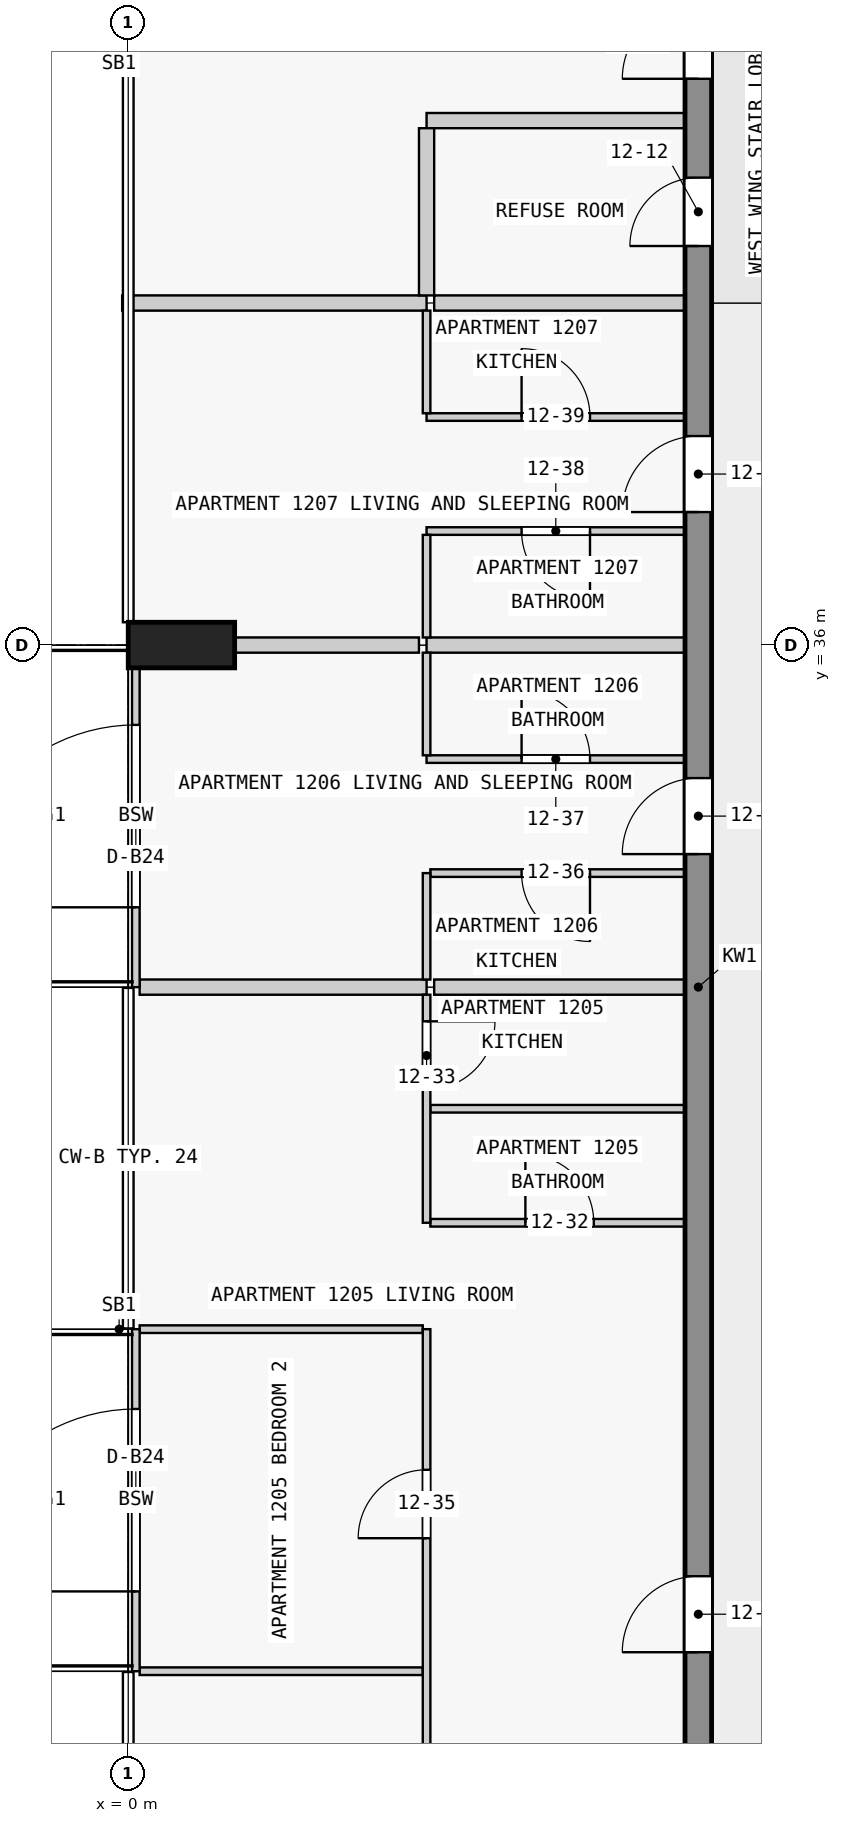
"""IFC4 building model, lengths in metres.
Left out: names, types, materials, properties, quantities, classifications, styles, units other than length and angle.
Written with IfcOpenShell. Run it as: python <this file> out.ifc"""

import sys

from ifc_helpers import new_model, si_unit, direction, frame, frame_2d, origin, origin_2d, place, context, subcontext, project, spatial, rectangle, extrude, element, fill, save


model = new_model("IFC4")
c1 = context("Model", 3, precision=1e-05, world=origin(), true_north=direction((0.0, 1.0)))
c2 = subcontext(c1, "Body", "Model", "MODEL_VIEW")
j1 = project(units=[si_unit("LENGTHUNIT", "METRE"), si_unit("PLANEANGLEUNIT", "RADIAN")], contexts=[c1])
p1 = place(None, origin())
s1 = spatial("IfcSite", under=j1, at=p1, CompositionType="ELEMENT")
p2 = place(p1, origin())
s2 = spatial("IfcBuilding", under=s1, at=p2, CompositionType="ELEMENT")
p3 = place(p2, frame((0.0, 0.0, 51.3)))
s3 = spatial("IfcBuildingStorey", under=s2, at=p3, CompositionType="ELEMENT", Elevation=51.3)
p4 = place(p3, frame((0.7, 36.0, 0.0), z_axis=(0.0, 0.0, 1.0), x_axis=(0.0, 1.0, 0.0)))
e1 = element("IfcColumn", 1, at=p4, inside=s3, PredefinedType="COLUMN", context=c2, shape_type="SweptSolid", body=[
    extrude(rectangle(XDim=0.6, YDim=1.4, at=origin_2d()), origin(), (0.0, 0.0, 1.0), 3.5),
])
p5 = place(p3, frame((7.5, 18.0, 0.0), z_axis=(0.0, 0.0, 1.0), x_axis=(0.0, 1.0, 0.0)))
e2 = element("IfcWall", 2, at=p5, inside=s3, PredefinedType="SHEAR", context=c2, shape_type="SweptSolid", body=[
    extrude(rectangle(XDim=27.0, YDim=0.35, at=frame_2d((13.5, 0.0))), origin(), (0.0, 0.0, 1.0), 3.25),
])
p6 = place(p5, frame((4.75, 0.0, 0.0)))
e3 = element("IfcOpeningElement", 3, at=p6, cuts=e2, PredefinedType="OPENING", context=c2, shape_type="SweptSolid", body=[
    extrude(rectangle(XDim=1.0, YDim=2.1, at=frame_2d((0.5, 1.05))), frame((0.0, 0.185, 0.0), z_axis=(0.0, -1.0, 0.0), x_axis=(1.0, 0.0, 0.0)), (0.0, 0.0, 1.0), 0.37),
])
p7 = place(p5, frame((15.25, 0.0, 0.0)))
e4 = element("IfcOpeningElement", 4, at=p7, cuts=e2, PredefinedType="OPENING", context=c2, shape_type="SweptSolid", body=[
    extrude(rectangle(XDim=1.0, YDim=2.1, at=frame_2d((0.5, 1.05))), frame((0.0, 0.185, 0.0), z_axis=(0.0, -1.0, 0.0), x_axis=(1.0, 0.0, 0.0)), (0.0, 0.0, 1.0), 0.37),
])
p8 = place(p5, frame((19.75, 0.0, 0.0)))
e5 = element("IfcOpeningElement", 5, at=p8, cuts=e2, PredefinedType="OPENING", context=c2, shape_type="SweptSolid", body=[
    extrude(rectangle(XDim=1.0, YDim=2.1, at=frame_2d((0.5, 1.05))), frame((0.0, 0.185, 0.0), z_axis=(0.0, -1.0, 0.0), x_axis=(1.0, 0.0, 0.0)), (0.0, 0.0, 1.0), 0.37),
])
p9 = place(p5, frame((23.25, 0.0, 0.0)))
e6 = element("IfcOpeningElement", 6, at=p9, cuts=e2, PredefinedType="OPENING", context=c2, shape_type="SweptSolid", body=[
    extrude(rectangle(XDim=0.9, YDim=2.1, at=frame_2d((0.45, 1.05))), frame((0.0, 0.185, 0.0), z_axis=(0.0, -1.0, 0.0), x_axis=(1.0, 0.0, 0.0)), (0.0, 0.0, 1.0), 0.37),
])
p10 = place(p5, frame((25.45, 0.0, 0.0)))
e7 = element("IfcOpeningElement", 7, at=p10, cuts=e2, PredefinedType="OPENING", context=c2, shape_type="SweptSolid", body=[
    extrude(rectangle(XDim=1.0, YDim=2.1, at=frame_2d((0.5, 1.05))), frame((0.0, 0.185, 0.0), z_axis=(0.0, -1.0, 0.0), x_axis=(1.0, 0.0, 0.0)), (0.0, 0.0, 1.0), 0.37),
])
p11 = place(p3, frame((0.1, 22.5, 0.0), z_axis=(0.0, 0.0, 1.0), x_axis=(0.0, 1.0, 0.0)))
e8 = element("IfcWall", 8, at=p11, inside=s3, PredefinedType="STANDARD", context=c2, shape_type="SweptSolid", body=[
    extrude(rectangle(XDim=4.5, YDim=0.1, at=frame_2d((2.25, 0.0))), origin(), (0.0, 0.0, 1.0), 3.25),
])
p12 = place(p11, frame((1.05, 0.0, 0.0)))
e9 = element("IfcOpeningElement", 9, at=p12, cuts=e8, PredefinedType="OPENING", context=c2, shape_type="SweptSolid", body=[
    extrude(rectangle(XDim=2.4, YDim=2.4, at=frame_2d((1.2, 1.2))), frame((0.0, 0.06, 0.0), z_axis=(0.0, -1.0, 0.0), x_axis=(1.0, 0.0, 0.0)), (0.0, 0.0, 1.0), 0.12),
])
p13 = place(p3, frame((0.1, 31.5, 0.0), z_axis=(0.0, 0.0, 1.0), x_axis=(0.0, 1.0, 0.0)))
e10 = element("IfcWall", 10, at=p13, inside=s3, PredefinedType="STANDARD", context=c2, shape_type="SweptSolid", body=[
    extrude(rectangle(XDim=4.5, YDim=0.1, at=frame_2d((2.25, 0.0))), origin(), (0.0, 0.0, 1.0), 3.25),
])
p14 = place(p13, frame((1.05, 0.0, 0.0)))
e11 = element("IfcOpeningElement", 11, at=p14, cuts=e10, PredefinedType="OPENING", context=c2, shape_type="SweptSolid", body=[
    extrude(rectangle(XDim=2.4, YDim=2.4, at=frame_2d((1.2, 1.2))), frame((0.0, 0.06, 0.0), z_axis=(0.0, -1.0, 0.0), x_axis=(1.0, 0.0, 0.0)), (0.0, 0.0, 1.0), 0.12),
])
for number, where, z_axis, x_axis in (
    (12, (3.875, 22.5, 0.0), (0.0, 0.0, 1.0), (-1.0, 0.0, 0.0)),
    (13, (3.875, 27.0, 0.0), (0.0, 0.0, 1.0), (-1.0, 0.0, 0.0)),
):
    element("IfcWall", number, at=place(p3, frame(where, z_axis=z_axis, x_axis=x_axis)), inside=s3, PredefinedType="PARTITIONING", context=c2, shape_type="SweptSolid", body=[
        extrude(rectangle(XDim=3.725, YDim=0.1, at=frame_2d((1.863, 0.0))), origin(), (0.0, 0.0, 1.0), 3.25),
    ])
p15 = place(p3, frame((3.975, 28.4, 0.0), z_axis=(0.0, 0.0, 1.0), x_axis=(1.0, 0.0, 0.0)))
e14 = element("IfcWall", 14, at=p15, inside=s3, PredefinedType="PARTITIONING", context=c2, shape_type="SweptSolid", body=[
    extrude(rectangle(XDim=3.35, YDim=0.1, at=frame_2d((1.675, 0.0))), origin(), (0.0, 0.0, 1.0), 3.25),
])
p16 = place(p15, frame((1.25, 0.0, 0.0)))
e15 = element("IfcOpeningElement", 15, at=p16, cuts=e14, PredefinedType="OPENING", context=c2, shape_type="SweptSolid", body=[
    extrude(rectangle(XDim=0.9, YDim=2.1, at=frame_2d((0.45, 1.05))), frame((0.0, 0.06, 0.0), z_axis=(0.0, -1.0, 0.0), x_axis=(1.0, 0.0, 0.0)), (0.0, 0.0, 1.0), 0.12),
])
p17 = place(p3, frame((7.325, 29.9, 0.0), z_axis=(0.0, 0.0, 1.0), x_axis=(-1.0, 0.0, 0.0)))
e16 = element("IfcWall", 16, at=p17, inside=s3, PredefinedType="PARTITIONING", context=c2, shape_type="SweptSolid", body=[
    extrude(rectangle(XDim=3.35, YDim=0.1, at=frame_2d((1.675, 0.0))), origin(), (0.0, 0.0, 1.0), 3.25),
])
p18 = place(p3, frame((7.325, 31.5, 0.0), z_axis=(0.0, 0.0, 1.0), x_axis=(-1.0, 0.0, 0.0)))
e17 = element("IfcWall", 17, at=p18, inside=s3, PredefinedType="PARTITIONING", context=c2, shape_type="SweptSolid", body=[
    extrude(rectangle(XDim=3.3, YDim=0.2, at=frame_2d((1.65, 0.0))), origin(), (0.0, 0.0, 1.0), 3.25),
])
p19 = place(p3, frame((0.15, 31.5, 0.0), z_axis=(0.0, 0.0, 1.0), x_axis=(1.0, 0.0, 0.0)))
e18 = element("IfcWall", 18, at=p19, inside=s3, PredefinedType="PARTITIONING", context=c2, shape_type="SweptSolid", body=[
    extrude(rectangle(XDim=3.775, YDim=0.2, at=frame_2d((1.888, 0.0))), origin(), (0.0, 0.0, 1.0), 3.25),
])
p20 = place(p3, frame((7.325, 33.0, 0.0), z_axis=(0.0, 0.0, 1.0), x_axis=(-1.0, 0.0, 0.0)))
e19 = element("IfcWall", 19, at=p20, inside=s3, PredefinedType="PARTITIONING", context=c2, shape_type="SweptSolid", body=[
    extrude(rectangle(XDim=3.35, YDim=0.1, at=frame_2d((1.675, 0.0))), origin(), (0.0, 0.0, 1.0), 3.25),
])
p21 = place(p20, frame((1.25, 0.0, 0.0)))
e20 = element("IfcOpeningElement", 20, at=p21, cuts=e19, PredefinedType="OPENING", context=c2, shape_type="SweptSolid", body=[
    extrude(rectangle(XDim=0.9, YDim=2.1, at=frame_2d((0.45, 1.05))), frame((0.0, 0.06, 0.0), z_axis=(0.0, -1.0, 0.0), x_axis=(1.0, 0.0, 0.0)), (0.0, 0.0, 1.0), 0.12),
])
p22 = place(p3, frame((3.925, 34.5, 0.0), z_axis=(0.0, 0.0, 1.0), x_axis=(1.0, 0.0, 0.0)))
e21 = element("IfcWall", 21, at=p22, inside=s3, PredefinedType="PARTITIONING", context=c2, shape_type="SweptSolid", body=[
    extrude(rectangle(XDim=3.4, YDim=0.1, at=frame_2d((1.7, 0.0))), origin(), (0.0, 0.0, 1.0), 3.25),
])
p23 = place(p22, frame((1.25, 0.0, 0.0)))
e22 = element("IfcOpeningElement", 22, at=p23, cuts=e21, PredefinedType="OPENING", context=c2, shape_type="SweptSolid", body=[
    extrude(rectangle(XDim=0.9, YDim=2.1, at=frame_2d((0.45, 1.05))), frame((0.0, 0.06, 0.0), z_axis=(0.0, -1.0, 0.0), x_axis=(1.0, 0.0, 0.0)), (0.0, 0.0, 1.0), 0.12),
])
p24 = place(p3, frame((7.325, 36.0, 0.0), z_axis=(0.0, 0.0, 1.0), x_axis=(-1.0, 0.0, 0.0)))
e23 = element("IfcWall", 23, at=p24, inside=s3, PredefinedType="PARTITIONING", context=c2, shape_type="SweptSolid", body=[
    extrude(rectangle(XDim=3.4, YDim=0.2, at=frame_2d((1.7, 0.0))), origin(), (0.0, 0.0, 1.0), 3.25),
])
p25 = place(p3, frame((1.4, 36.0, 0.0), z_axis=(0.0, 0.0, 1.0), x_axis=(1.0, 0.0, 0.0)))
e24 = element("IfcWall", 24, at=p25, inside=s3, PredefinedType="PARTITIONING", context=c2, shape_type="SweptSolid", body=[
    extrude(rectangle(XDim=2.425, YDim=0.2, at=frame_2d((1.212, 0.0))), origin(), (0.0, 0.0, 1.0), 3.25),
])
p26 = place(p3, frame((7.325, 37.5, 0.0), z_axis=(0.0, 0.0, 1.0), x_axis=(-1.0, 0.0, 0.0)))
e25 = element("IfcWall", 25, at=p26, inside=s3, PredefinedType="PARTITIONING", context=c2, shape_type="SweptSolid", body=[
    extrude(rectangle(XDim=3.4, YDim=0.1, at=frame_2d((1.7, 0.0))), origin(), (0.0, 0.0, 1.0), 3.25),
])
p27 = place(p26, frame((1.25, 0.0, 0.0)))
e26 = element("IfcOpeningElement", 26, at=p27, cuts=e25, PredefinedType="OPENING", context=c2, shape_type="SweptSolid", body=[
    extrude(rectangle(XDim=0.9, YDim=2.1, at=frame_2d((0.45, 1.05))), frame((0.0, 0.06, 0.0), z_axis=(0.0, -1.0, 0.0), x_axis=(1.0, 0.0, 0.0)), (0.0, 0.0, 1.0), 0.12),
])
p28 = place(p3, frame((3.925, 39.0, 0.0), z_axis=(0.0, 0.0, 1.0), x_axis=(1.0, 0.0, 0.0)))
e27 = element("IfcWall", 27, at=p28, inside=s3, PredefinedType="PARTITIONING", context=c2, shape_type="SweptSolid", body=[
    extrude(rectangle(XDim=3.4, YDim=0.1, at=frame_2d((1.7, 0.0))), origin(), (0.0, 0.0, 1.0), 3.25),
])
p29 = place(p28, frame((1.25, 0.0, 0.0)))
e28 = element("IfcOpeningElement", 28, at=p29, cuts=e27, PredefinedType="OPENING", context=c2, shape_type="SweptSolid", body=[
    extrude(rectangle(XDim=0.9, YDim=2.1, at=frame_2d((0.45, 1.05))), frame((0.0, 0.06, 0.0), z_axis=(0.0, -1.0, 0.0), x_axis=(1.0, 0.0, 0.0)), (0.0, 0.0, 1.0), 0.12),
])
p30 = place(p3, frame((7.325, 40.5, 0.0), z_axis=(0.0, 0.0, 1.0), x_axis=(-1.0, 0.0, 0.0)))
e29 = element("IfcWall", 29, at=p30, inside=s3, PredefinedType="PARTITIONING", context=c2, shape_type="SweptSolid", body=[
    extrude(rectangle(XDim=3.3, YDim=0.2, at=frame_2d((1.65, 0.0))), origin(), (0.0, 0.0, 1.0), 3.25),
])
p31 = place(p3, frame((-0.08, 40.5, 0.0), z_axis=(0.0, 0.0, 1.0), x_axis=(1.0, 0.0, 0.0)))
e30 = element("IfcWall", 30, at=p31, inside=s3, PredefinedType="PARTITIONING", context=c2, shape_type="SweptSolid", body=[
    extrude(rectangle(XDim=4.005, YDim=0.2, at=frame_2d((2.002, 0.0))), origin(), (0.0, 0.0, 1.0), 3.25),
])
p32 = place(p3, frame((7.325, 42.9, 0.0), z_axis=(0.0, 0.0, 1.0), x_axis=(-1.0, 0.0, 0.0)))
e31 = element("IfcWall", 31, at=p32, inside=s3, PredefinedType="PARTITIONING", context=c2, shape_type="SweptSolid", body=[
    extrude(rectangle(XDim=3.4, YDim=0.2, at=frame_2d((1.7, 0.0))), origin(), (0.0, 0.0, 1.0), 3.25),
])
p33 = place(p3, frame((3.925, 31.4, 0.0), z_axis=(0.0, 0.0, 1.0), x_axis=(0.0, -1.0, 0.0)))
e32 = element("IfcWall", 32, at=p33, inside=s3, PredefinedType="PARTITIONING", context=c2, shape_type="SweptSolid", body=[
    extrude(rectangle(XDim=3.0, YDim=0.1, at=frame_2d((1.5, 0.0))), origin(), (0.0, 0.0, 1.0), 3.25),
])
p34 = place(p33, frame((0.35, 0.0, 0.0)))
e33 = element("IfcOpeningElement", 33, at=p34, cuts=e32, PredefinedType="OPENING", context=c2, shape_type="SweptSolid", body=[
    extrude(rectangle(XDim=0.9, YDim=2.1, at=frame_2d((0.45, 1.05))), frame((0.0, 0.06, 0.0), z_axis=(0.0, -1.0, 0.0), x_axis=(1.0, 0.0, 0.0)), (0.0, 0.0, 1.0), 0.12),
])
p35 = place(p3, frame((3.925, 33.0, 0.0), z_axis=(0.0, 0.0, 1.0), x_axis=(0.0, -1.0, 0.0)))
e34 = element("IfcWall", 34, at=p35, inside=s3, PredefinedType="PARTITIONING", context=c2, shape_type="SweptSolid", body=[
    extrude(rectangle(XDim=1.4, YDim=0.1, at=frame_2d((0.7, 0.0))), origin(), (0.0, 0.0, 1.0), 3.25),
])
for number, where, z_axis, x_axis in (
    (35, (3.925, 35.9, 0.0), (0.0, 0.0, 1.0), (0.0, -1.0, 0.0)),
    (36, (3.925, 37.45, 0.0), (0.0, 0.0, 1.0), (0.0, -1.0, 0.0)),
    (37, (3.925, 40.4, 0.0), (0.0, 0.0, 1.0), (0.0, -1.0, 0.0)),
):
    element("IfcWall", number, at=place(p3, frame(where, z_axis=z_axis, x_axis=x_axis)), inside=s3, PredefinedType="PARTITIONING", context=c2, shape_type="SweptSolid", body=[
        extrude(rectangle(XDim=1.35, YDim=0.1, at=frame_2d((0.675, 0.0))), origin(), (0.0, 0.0, 1.0), 3.25),
    ])
p36 = place(p3, frame((3.925, 18.0, 0.0), z_axis=(0.0, 0.0, 1.0), x_axis=(0.0, 1.0, 0.0)))
e38 = element("IfcWall", 38, at=p36, inside=s3, PredefinedType="PARTITIONING", context=c2, shape_type="SweptSolid", body=[
    extrude(rectangle(XDim=9.0, YDim=0.1, at=frame_2d((4.5, 0.0))), origin(), (0.0, 0.0, 1.0), 3.25),
])
p37 = place(p36, frame((1.85, 0.0, 0.0)))
e39 = element("IfcOpeningElement", 39, at=p37, cuts=e38, PredefinedType="OPENING", context=c2, shape_type="SweptSolid", body=[
    extrude(rectangle(XDim=0.9, YDim=2.1, at=frame_2d((0.45, 1.05))), frame((0.0, 0.06, 0.0), z_axis=(0.0, -1.0, 0.0), x_axis=(1.0, 0.0, 0.0)), (0.0, 0.0, 1.0), 0.12),
])
p38 = place(p36, frame((6.25, 0.0, 0.0)))
e40 = element("IfcOpeningElement", 40, at=p38, cuts=e38, PredefinedType="OPENING", context=c2, shape_type="SweptSolid", body=[
    extrude(rectangle(XDim=0.9, YDim=2.1, at=frame_2d((0.45, 1.05))), frame((0.0, 0.06, 0.0), z_axis=(0.0, -1.0, 0.0), x_axis=(1.0, 0.0, 0.0)), (0.0, 0.0, 1.0), 0.12),
])
p39 = place(p3, frame((3.925, 42.8, 0.0), z_axis=(0.0, 0.0, 1.0), x_axis=(0.0, -1.0, 0.0)))
e41 = element("IfcWall", 41, at=p39, inside=s3, PredefinedType="PARTITIONING", context=c2, shape_type="SweptSolid", body=[
    extrude(rectangle(XDim=2.2, YDim=0.2, at=frame_2d((1.1, 0.0))), origin(), (0.0, 0.0, 1.0), 3.25),
])
p40 = place(p12, origin())
e42 = element("IfcDoor", 42, at=p40, inside=s3, OperationType="SINGLE_SWING_LEFT", PredefinedType="DOOR", context=c2, shape_type="SweptSolid", body=[
    extrude(rectangle(XDim=2.4, YDim=2.4, at=frame_2d((1.2, 1.2))), frame((0.0, 0.025, 0.0), z_axis=(0.0, -1.0, 0.0), x_axis=(1.0, 0.0, 0.0)), (0.0, 0.0, 1.0), 0.05),
])
fill(e9, e42)
p41 = place(p14, origin())
e43 = element("IfcDoor", 43, at=p41, inside=s3, OperationType="SINGLE_SWING_LEFT", PredefinedType="DOOR", context=c2, shape_type="SweptSolid", body=[
    extrude(rectangle(XDim=2.4, YDim=2.4, at=frame_2d((1.2, 1.2))), frame((0.0, 0.025, 0.0), z_axis=(0.0, -1.0, 0.0), x_axis=(1.0, 0.0, 0.0)), (0.0, 0.0, 1.0), 0.05),
])
fill(e11, e43)
p42 = place(p6, origin())
e44 = element("IfcDoor", 44, at=p42, inside=s3, OperationType="SINGLE_SWING_LEFT", PredefinedType="DOOR", context=c2, shape_type="SweptSolid", body=[
    extrude(rectangle(XDim=1.0, YDim=2.1, at=frame_2d((0.5, 1.05))), frame((0.0, 0.025, 0.0), z_axis=(0.0, -1.0, 0.0), x_axis=(1.0, 0.0, 0.0)), (0.0, 0.0, 1.0), 0.05),
])
fill(e3, e44)
p43 = place(p7, origin())
e45 = element("IfcDoor", 45, at=p43, inside=s3, OperationType="SINGLE_SWING_RIGHT", PredefinedType="DOOR", context=c2, shape_type="SweptSolid", body=[
    extrude(rectangle(XDim=1.0, YDim=2.1, at=frame_2d((0.5, 1.05))), frame((0.0, 0.025, 0.0), z_axis=(0.0, -1.0, 0.0), x_axis=(1.0, 0.0, 0.0)), (0.0, 0.0, 1.0), 0.05),
])
fill(e4, e45)
p44 = place(p8, origin())
e46 = element("IfcDoor", 46, at=p44, inside=s3, OperationType="SINGLE_SWING_RIGHT", PredefinedType="DOOR", context=c2, shape_type="SweptSolid", body=[
    extrude(rectangle(XDim=1.0, YDim=2.1, at=frame_2d((0.5, 1.05))), frame((0.0, 0.025, 0.0), z_axis=(0.0, -1.0, 0.0), x_axis=(1.0, 0.0, 0.0)), (0.0, 0.0, 1.0), 0.05),
])
fill(e5, e46)
p45 = place(p9, origin())
e47 = element("IfcDoor", 47, at=p45, inside=s3, OperationType="SINGLE_SWING_RIGHT", PredefinedType="DOOR", context=c2, shape_type="SweptSolid", body=[
    extrude(rectangle(XDim=0.9, YDim=2.1, at=frame_2d((0.45, 1.05))), frame((0.0, 0.025, 0.0), z_axis=(0.0, -1.0, 0.0), x_axis=(1.0, 0.0, 0.0)), (0.0, 0.0, 1.0), 0.05),
])
fill(e6, e47)
p46 = place(p10, origin())
e48 = element("IfcDoor", 48, at=p46, inside=s3, OperationType="SINGLE_SWING_RIGHT", PredefinedType="DOOR", context=c2, shape_type="SweptSolid", body=[
    extrude(rectangle(XDim=1.0, YDim=2.1, at=frame_2d((0.5, 1.05))), frame((0.0, 0.025, 0.0), z_axis=(0.0, -1.0, 0.0), x_axis=(1.0, 0.0, 0.0)), (0.0, 0.0, 1.0), 0.05),
])
fill(e7, e48)
p47 = place(p16, origin())
e49 = element("IfcDoor", 49, at=p47, inside=s3, OperationType="SINGLE_SWING_RIGHT", PredefinedType="DOOR", context=c2, shape_type="SweptSolid", body=[
    extrude(rectangle(XDim=0.9, YDim=2.1, at=frame_2d((0.45, 1.05))), frame((0.0, 0.025, 0.0), z_axis=(0.0, -1.0, 0.0), x_axis=(1.0, 0.0, 0.0)), (0.0, 0.0, 1.0), 0.05),
])
fill(e15, e49)
p48 = place(p34, origin())
e50 = element("IfcDoor", 50, at=p48, inside=s3, OperationType="SINGLE_SWING_LEFT", PredefinedType="DOOR", context=c2, shape_type="SweptSolid", body=[
    extrude(rectangle(XDim=0.9, YDim=2.1, at=frame_2d((0.45, 1.05))), frame((0.0, 0.025, 0.0), z_axis=(0.0, -1.0, 0.0), x_axis=(1.0, 0.0, 0.0)), (0.0, 0.0, 1.0), 0.05),
])
fill(e33, e50)
p49 = place(p38, origin())
e51 = element("IfcDoor", 51, at=p49, inside=s3, OperationType="SINGLE_SWING_RIGHT", PredefinedType="DOOR", context=c2, shape_type="SweptSolid", body=[
    extrude(rectangle(XDim=0.9, YDim=2.1, at=frame_2d((0.45, 1.05))), frame((0.0, 0.025, 0.0), z_axis=(0.0, -1.0, 0.0), x_axis=(1.0, 0.0, 0.0)), (0.0, 0.0, 1.0), 0.05),
])
fill(e40, e51)
p50 = place(p21, origin())
e52 = element("IfcDoor", 52, at=p50, inside=s3, OperationType="SINGLE_SWING_RIGHT", PredefinedType="DOOR", context=c2, shape_type="SweptSolid", body=[
    extrude(rectangle(XDim=0.9, YDim=2.1, at=frame_2d((0.45, 1.05))), frame((0.0, 0.025, 0.0), z_axis=(0.0, -1.0, 0.0), x_axis=(1.0, 0.0, 0.0)), (0.0, 0.0, 1.0), 0.05),
])
fill(e20, e52)
p51 = place(p23, origin())
e53 = element("IfcDoor", 53, at=p51, inside=s3, OperationType="SINGLE_SWING_LEFT", PredefinedType="DOOR", context=c2, shape_type="SweptSolid", body=[
    extrude(rectangle(XDim=0.9, YDim=2.1, at=frame_2d((0.45, 1.05))), frame((0.0, 0.025, 0.0), z_axis=(0.0, -1.0, 0.0), x_axis=(1.0, 0.0, 0.0)), (0.0, 0.0, 1.0), 0.05),
])
fill(e22, e53)
p52 = place(p27, origin())
e54 = element("IfcDoor", 54, at=p52, inside=s3, OperationType="SINGLE_SWING_LEFT", PredefinedType="DOOR", context=c2, shape_type="SweptSolid", body=[
    extrude(rectangle(XDim=0.9, YDim=2.1, at=frame_2d((0.45, 1.05))), frame((0.0, 0.025, 0.0), z_axis=(0.0, -1.0, 0.0), x_axis=(1.0, 0.0, 0.0)), (0.0, 0.0, 1.0), 0.05),
])
fill(e26, e54)
p53 = place(p29, origin())
e55 = element("IfcDoor", 55, at=p53, inside=s3, OperationType="SINGLE_SWING_LEFT", PredefinedType="DOOR", context=c2, shape_type="SweptSolid", body=[
    extrude(rectangle(XDim=0.9, YDim=2.1, at=frame_2d((0.45, 1.05))), frame((0.0, 0.025, 0.0), z_axis=(0.0, -1.0, 0.0), x_axis=(1.0, 0.0, 0.0)), (0.0, 0.0, 1.0), 0.05),
])
fill(e28, e55)
save(model, sys.argv[1])
